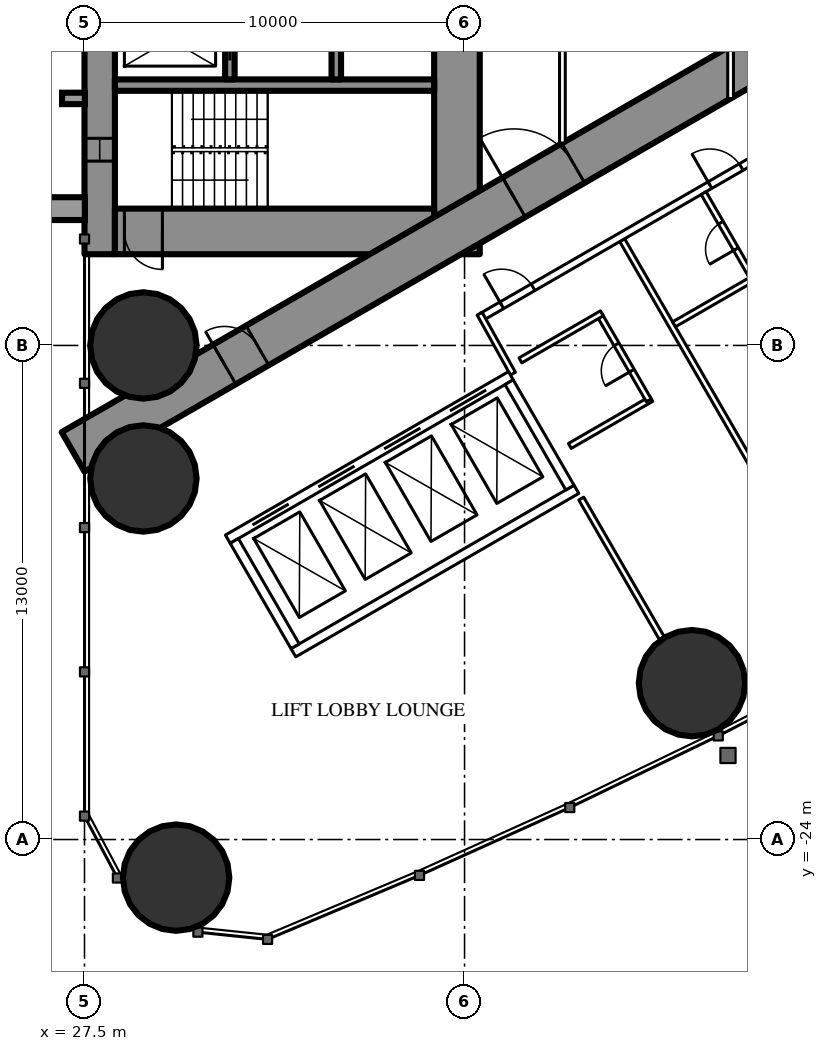
"""IFC4 building model, lengths in metres.
Left out: names, types, materials, properties, quantities, classifications, styles, units other than length and angle.
Written with IfcOpenShell. Run it as: python <this file> out.ifc"""

import sys

from ifc_helpers import new_model, si_unit, direction, frame, frame_2d, origin, origin_2d, place, context, subcontext, project, spatial, rectangle, hollow_circle, extrude, element, fill, save


model = new_model("IFC4")
c1 = context("Model", 3, precision=1e-05, world=origin(), true_north=direction((0.0, 1.0)))
c2 = subcontext(c1, "Body", "Model", "MODEL_VIEW")
j1 = project(units=[si_unit("LENGTHUNIT", "METRE"), si_unit("PLANEANGLEUNIT", "RADIAN")], contexts=[c1])
p1 = place(None, origin())
s1 = spatial("IfcSite", under=j1, at=p1, CompositionType="ELEMENT")
p2 = place(p1, origin())
s2 = spatial("IfcBuilding", under=s1, at=p2, CompositionType="ELEMENT")
p3 = place(p2, frame((0.0, 0.0, 53.0)))
s3 = spatial("IfcBuildingStorey", under=s2, at=p3, CompositionType="ELEMENT", Elevation=53.0)
for number, where, z_axis, x_axis in (
    (1, (29.911, -25.002, 0.0), (0.0, 0.0, 1.0), (1.0, 0.0, 0.0)),
    (2, (29.05, -11.0, 0.0), (0.0, 0.0, 1.0), (1.0, 0.0, 0.0)),
    (3, (29.05, -14.5, 0.0), (0.0, 0.0, 1.0), (1.0, 0.0, 0.0)),
    (4, (43.484, -19.886, 0.0), (0.0, 0.0, 1.0), (1.0, 0.0, 0.0)),
):
    element("IfcColumn", number, at=place(p3, frame(where, z_axis=z_axis, x_axis=x_axis)), inside=s3, PredefinedType="COLUMN", context=c2, shape_type="SweptSolid", body=[
        extrude(hollow_circle(Radius=1.4, WallThickness=0.12, at=origin_2d()), origin(), (0.0, 0.0, 1.0), 3.5),
    ])
p4 = place(p3, frame((27.9, -8.6, 0.0), z_axis=(0.0, 0.0, 1.0), x_axis=(0.0, 1.0, 0.0)))
e5 = element("IfcWall", 5, at=p4, inside=s3, PredefinedType="SHEAR", context=c2, shape_type="SweptSolid", body=[
    extrude(rectangle(XDim=17.2, YDim=0.8, at=frame_2d((8.6, 0.0))), origin(), (0.0, 0.0, 1.0), 3.5),
])
p5 = place(p4, frame((2.45, 0.0, 0.6)))
e6 = element("IfcOpeningElement", 6, at=p5, cuts=e5, PredefinedType="OPENING", context=c2, shape_type="SweptSolid", body=[
    extrude(rectangle(XDim=0.6, YDim=2.1, at=frame_2d((0.3, 1.05))), frame((0.0, 0.41, 0.0), z_axis=(0.0, -1.0, 0.0), x_axis=(1.0, 0.0, 0.0)), (0.0, 0.0, 1.0), 0.82),
])
p6 = place(p4, frame((14.15, 0.0, 0.6)))
e7 = element("IfcOpeningElement", 7, at=p6, cuts=e5, PredefinedType="OPENING", context=c2, shape_type="SweptSolid", body=[
    extrude(rectangle(XDim=0.6, YDim=2.1, at=frame_2d((0.3, 1.05))), frame((0.0, 0.41, 0.0), z_axis=(0.0, -1.0, 0.0), x_axis=(1.0, 0.0, 0.0)), (0.0, 0.0, 1.0), 0.82),
])
p7 = place(p3, frame((37.3, -8.6, 0.0), z_axis=(0.0, 0.0, 1.0), x_axis=(0.0, 1.0, 0.0)))
e8 = element("IfcWall", 8, at=p7, inside=s3, PredefinedType="SHEAR", context=c2, shape_type="SweptSolid", body=[
    extrude(rectangle(XDim=17.2, YDim=1.2, at=frame_2d((8.6, 0.0))), origin(), (0.0, 0.0, 1.0), 3.5),
])
p8 = place(p7, frame((7.7, 0.0, 0.0)))
e9 = element("IfcOpeningElement", 9, at=p8, cuts=e8, PredefinedType="OPENING", context=c2, shape_type="SweptSolid", body=[
    extrude(rectangle(XDim=1.8, YDim=2.2, at=frame_2d((0.9, 1.1))), frame((0.0, 0.61, 0.0), z_axis=(0.0, -1.0, 0.0), x_axis=(1.0, 0.0, 0.0)), (0.0, 0.0, 1.0), 1.22),
])
p9 = place(p3, frame((28.3, -8.0, 0.0), z_axis=(0.0, 0.0, 1.0), x_axis=(1.0, 0.0, 0.0)))
e10 = element("IfcWall", 10, at=p9, inside=s3, PredefinedType="SHEAR", context=c2, shape_type="SweptSolid", body=[
    extrude(rectangle(XDim=8.4, YDim=1.2, at=frame_2d((4.2, 0.0))), origin(), (0.0, 0.0, 1.0), 3.5),
])
p10 = place(p9, frame((0.25, 0.0, 0.0)))
e11 = element("IfcOpeningElement", 11, at=p10, cuts=e10, PredefinedType="OPENING", context=c2, shape_type="SweptSolid", body=[
    extrude(rectangle(XDim=1.0, YDim=2.2, at=frame_2d((0.5, 1.1))), frame((0.0, 0.61, 0.0), z_axis=(0.0, -1.0, 0.0), x_axis=(1.0, 0.0, 0.0)), (0.0, 0.0, 1.0), 1.22),
])
p11 = place(p3, frame((28.3, -4.15, 0.0), z_axis=(0.0, 0.0, 1.0), x_axis=(1.0, 0.0, 0.0)))
e12 = element("IfcWall", 12, at=p11, inside=s3, PredefinedType="SHEAR", context=c2, shape_type="SweptSolid", body=[
    extrude(rectangle(XDim=8.4, YDim=0.3, at=frame_2d((4.2, 0.0))), origin(), (0.0, 0.0, 1.0), 3.5),
])
p12 = place(p3, frame((31.325, -4.0, 0.0), z_axis=(0.0, 0.0, 1.0), x_axis=(0.0, 1.0, 0.0)))
e13 = element("IfcWall", 13, at=p12, inside=s3, PredefinedType="SHEAR", context=c2, shape_type="SweptSolid", body=[
    extrude(rectangle(XDim=2.1, YDim=0.25, at=frame_2d((1.05, 0.0))), origin(), (0.0, 0.0, 1.0), 3.5),
])
p13 = place(p12, frame((0.5, 0.0, 0.0)))
e14 = element("IfcOpeningElement", 14, at=p13, cuts=e13, PredefinedType="OPENING", context=c2, shape_type="SweptSolid", body=[
    extrude(rectangle(XDim=1.1, YDim=2.2, at=frame_2d((0.55, 1.1))), frame((0.0, 0.135, 0.0), z_axis=(0.0, -1.0, 0.0), x_axis=(1.0, 0.0, 0.0)), (0.0, 0.0, 1.0), 0.27),
])
p14 = place(p3, frame((34.125, -4.0, 0.0), z_axis=(0.0, 0.0, 1.0), x_axis=(0.0, 1.0, 0.0)))
e15 = element("IfcWall", 15, at=p14, inside=s3, PredefinedType="SHEAR", context=c2, shape_type="SweptSolid", body=[
    extrude(rectangle(XDim=2.35, YDim=0.25, at=frame_2d((1.175, 0.0))), origin(), (0.0, 0.0, 1.0), 3.5),
])
p15 = place(p3, frame((27.2, -13.8, 0.0), z_axis=(0.0, 0.0, 1.0), x_axis=(0.866027159892, 0.499996958321, 0.0)))
e16 = element("IfcWall", 16, at=p15, inside=s3, PredefinedType="SHEAR", context=c2, shape_type="SweptSolid", body=[
    extrude(rectangle(XDim=27.947, YDim=1.2, at=frame_2d((13.973, 0.0))), origin(), (0.0, 0.0, 1.0), 3.5),
])
p16 = place(p15, frame((4.6, 0.0, 0.0)))
e17 = element("IfcOpeningElement", 17, at=p16, cuts=e16, PredefinedType="OPENING", context=c2, shape_type="SweptSolid", body=[
    extrude(rectangle(XDim=1.0, YDim=2.2, at=frame_2d((0.5, 1.1))), frame((0.0, 0.61, 0.0), z_axis=(0.0, -1.0, 0.0), x_axis=(1.0, 0.0, 0.0)), (0.0, 0.0, 1.0), 1.22),
])
p17 = place(p15, frame((13.395, 0.0, 0.0)))
e18 = element("IfcOpeningElement", 18, at=p17, cuts=e16, PredefinedType="OPENING", context=c2, shape_type="SweptSolid", body=[
    extrude(rectangle(XDim=1.8, YDim=2.2, at=frame_2d((0.9, 1.1))), frame((0.0, 0.61, 0.0), z_axis=(0.0, -1.0, 0.0), x_axis=(1.0, 0.0, 0.0)), (0.0, 0.0, 1.0), 1.22),
])
p18 = place(p3, frame((41.647, -8.23, 0.0), z_axis=(0.0, 0.0, 1.0), x_axis=(0.49998590462, -0.866033541603, 0.0)))
e19 = element("IfcWall", 19, at=p18, inside=s3, PredefinedType="PARTITIONING", context=c2, shape_type="SweptSolid", body=[
    extrude(rectangle(XDim=12.621, YDim=0.15, at=frame_2d((6.311, 0.0))), origin(), (0.0, 0.0, 1.0), 3.25),
])
p19 = place(p3, frame((40.57, -15.03, 0.0), z_axis=(0.0, 0.0, 1.0), x_axis=(0.500012993597, -0.866017901798, 0.0)))
e20 = element("IfcWall", 20, at=p19, inside=s3, PredefinedType="PARTITIONING", context=c2, shape_type="SweptSolid", body=[
    extrude(rectangle(XDim=4.243, YDim=0.15, at=frame_2d((2.122, 0.0))), origin(), (0.0, 0.0, 1.0), 3.25),
])
p20 = place(p3, frame((37.96, -10.243, 0.0), z_axis=(0.0, 0.0, 1.0), x_axis=(0.866026429433, 0.499998223521, 0.0)))
e21 = element("IfcWall", 21, at=p20, inside=s3, PredefinedType="PARTITIONING", context=c2, shape_type="SweptSolid", body=[
    extrude(rectangle(XDim=20.487, YDim=0.2, at=frame_2d((10.243, 0.0))), origin(), (0.0, 0.0, 1.0), 3.25),
])
p21 = place(p20, frame((6.925, 0.0, 0.0)))
e22 = element("IfcOpeningElement", 22, at=p21, cuts=e21, PredefinedType="OPENING", context=c2, shape_type="SweptSolid", body=[
    extrude(rectangle(XDim=0.95, YDim=2.2, at=frame_2d((0.475, 1.1))), frame((0.0, 0.11, 0.0), z_axis=(0.0, -1.0, 0.0), x_axis=(1.0, 0.0, 0.0)), (0.0, 0.0, 1.0), 0.22),
])
p22 = place(p20, frame((11.549, 0.0, 0.0)))
e23 = element("IfcOpeningElement", 23, at=p22, cuts=e21, PredefinedType="OPENING", context=c2, shape_type="SweptSolid", body=[
    extrude(rectangle(XDim=0.95, YDim=2.2, at=frame_2d((0.475, 1.1))), frame((0.0, 0.11, 0.0), z_axis=(0.0, -1.0, 0.0), x_axis=(1.0, 0.0, 0.0)), (0.0, 0.0, 1.0), 0.22),
])
p23 = place(p20, frame((13.249, 0.0, 0.0)))
e24 = element("IfcOpeningElement", 24, at=p23, cuts=e21, PredefinedType="OPENING", context=c2, shape_type="SweptSolid", body=[
    extrude(rectangle(XDim=0.95, YDim=2.2, at=frame_2d((0.475, 1.1))), frame((0.0, 0.11, 0.0), z_axis=(0.0, -1.0, 0.0), x_axis=(1.0, 0.0, 0.0)), (0.0, 0.0, 1.0), 0.22),
])
p24 = place(p20, frame((17.585, 0.0, 0.0)))
e25 = element("IfcOpeningElement", 25, at=p24, cuts=e21, PredefinedType="OPENING", context=c2, shape_type="SweptSolid", body=[
    extrude(rectangle(XDim=0.95, YDim=2.2, at=frame_2d((0.475, 1.1))), frame((0.0, 0.11, 0.0), z_axis=(0.0, -1.0, 0.0), x_axis=(1.0, 0.0, 0.0)), (0.0, 0.0, 1.0), 0.22),
])
p25 = place(p20, frame((0.6, 0.0, 0.0)))
e26 = element("IfcOpeningElement", 26, at=p25, cuts=e21, PredefinedType="OPENING", context=c2, shape_type="SweptSolid", body=[
    extrude(rectangle(XDim=0.95, YDim=2.2, at=frame_2d((0.475, 1.1))), frame((0.0, 0.11, 0.0), z_axis=(0.0, -1.0, 0.0), x_axis=(1.0, 0.0, 0.0)), (0.0, 0.0, 1.0), 0.22),
])
p26 = place(p3, frame((38.773, -11.742, 0.0), z_axis=(0.0, 0.0, 1.0), x_axis=(-0.485528096672, 0.8742210632, 0.0)))
e27 = element("IfcWall", 27, at=p26, inside=s3, PredefinedType="PARTITIONING", context=c2, shape_type="SweptSolid", body=[
    extrude(rectangle(XDim=1.805, YDim=0.15, at=frame_2d((0.903, 0.0))), origin(), (0.0, 0.0, 1.0), 3.25),
])
p27 = place(p3, frame((43.012, -10.444, 0.0), z_axis=(0.0, 0.0, 1.0), x_axis=(0.866031185235, 0.4999899861, 0.0)))
e28 = element("IfcWall", 28, at=p27, inside=s3, PredefinedType="PARTITIONING", context=c2, shape_type="SweptSolid", body=[
    extrude(rectangle(XDim=2.475, YDim=0.15, at=frame_2d((1.238, 0.0))), origin(), (0.0, 0.0, 1.0), 3.25),
])
p28 = place(p3, frame((43.791, -6.993, 0.0), z_axis=(0.0, 0.0, 1.0), x_axis=(0.500047596559, -0.865997922154, 0.0)))
e29 = element("IfcWall", 29, at=p28, inside=s3, PredefinedType="PARTITIONING", context=c2, shape_type="SweptSolid", body=[
    extrude(rectangle(XDim=2.6, YDim=0.15, at=frame_2d((1.3, 0.0))), origin(), (0.0, 0.0, 1.0), 3.25),
])
p29 = place(p28, frame((0.9, 0.0, 0.0)))
e30 = element("IfcOpeningElement", 30, at=p29, cuts=e29, PredefinedType="OPENING", context=c2, shape_type="SweptSolid", body=[
    extrude(rectangle(XDim=0.8, YDim=2.2, at=frame_2d((0.4, 1.1))), frame((0.0, 0.085, 0.0), z_axis=(0.0, -1.0, 0.0), x_axis=(1.0, 0.0, 0.0)), (0.0, 0.0, 1.0), 0.17),
])
p30 = place(p3, frame((40.27, -13.644, 0.0), z_axis=(0.0, 0.0, 1.0), x_axis=(0.866031185235, 0.4999899861, 0.0)))
e31 = element("IfcWall", 31, at=p30, inside=s3, PredefinedType="PARTITIONING", context=c2, shape_type="SweptSolid", body=[
    extrude(rectangle(XDim=2.475, YDim=0.15, at=frame_2d((1.238, 0.0))), origin(), (0.0, 0.0, 1.0), 3.25),
])
p31 = place(p3, frame((41.048, -10.193, 0.0), z_axis=(0.0, 0.0, 1.0), x_axis=(0.500047596559, -0.865997922154, 0.0)))
e32 = element("IfcWall", 32, at=p31, inside=s3, PredefinedType="PARTITIONING", context=c2, shape_type="SweptSolid", body=[
    extrude(rectangle(XDim=2.6, YDim=0.15, at=frame_2d((1.3, 0.0))), origin(), (0.0, 0.0, 1.0), 3.25),
])
p32 = place(p31, frame((0.9, 0.0, 0.0)))
e33 = element("IfcOpeningElement", 33, at=p32, cuts=e32, PredefinedType="OPENING", context=c2, shape_type="SweptSolid", body=[
    extrude(rectangle(XDim=0.8, YDim=2.2, at=frame_2d((0.4, 1.1))), frame((0.0, 0.085, 0.0), z_axis=(0.0, -1.0, 0.0), x_axis=(1.0, 0.0, 0.0)), (0.0, 0.0, 1.0), 0.17),
])
p33 = place(p3, frame((38.97, -11.393, 0.0), z_axis=(0.0, 0.0, 1.0), x_axis=(0.866031185235, 0.4999899861, 0.0)))
e34 = element("IfcWall", 34, at=p33, inside=s3, PredefinedType="PARTITIONING", context=c2, shape_type="SweptSolid", body=[
    extrude(rectangle(XDim=2.475, YDim=0.15, at=frame_2d((1.238, 0.0))), origin(), (0.0, 0.0, 1.0), 3.25),
])
p34 = place(p3, frame((40.075, -5.674, 0.0), z_axis=(0.0, 0.0, 1.0), x_axis=(0.0, 1.0, 0.0)))
e35 = element("IfcWall", 35, at=p34, inside=s3, PredefinedType="PARTITIONING", context=c2, shape_type="SweptSolid", body=[
    extrude(rectangle(XDim=6.874, YDim=0.15, at=frame_2d((3.437, 0.0))), origin(), (0.0, 0.0, 1.0), 3.25),
])
p35 = place(p34, frame((2.537, 0.0, 0.0)))
e36 = element("IfcOpeningElement", 36, at=p35, cuts=e35, PredefinedType="OPENING", context=c2, shape_type="SweptSolid", body=[
    extrude(rectangle(XDim=1.8, YDim=2.2, at=frame_2d((0.9, 1.1))), frame((0.0, 0.085, 0.0), z_axis=(0.0, -1.0, 0.0), x_axis=(1.0, 0.0, 0.0)), (0.0, 0.0, 1.0), 0.17),
])
p36 = place(p3, frame((44.5, -4.505, 0.0), z_axis=(0.0, 0.0, 1.0), x_axis=(0.0, 1.0, 0.0)))
e37 = element("IfcWall", 37, at=p36, inside=s3, PredefinedType="PARTITIONING", context=c2, shape_type="SweptSolid", body=[
    extrude(rectangle(XDim=9.009, YDim=0.15, at=frame_2d((4.505, 0.0))), origin(), (0.0, 0.0, 1.0), 2.45),
])
p37 = place(p36, frame((1.752, 0.0, 0.0)))
e38 = element("IfcOpeningElement", 38, at=p37, cuts=e37, PredefinedType="OPENING", context=c2, shape_type="SweptSolid", body=[
    extrude(rectangle(XDim=1.0, YDim=2.2, at=frame_2d((0.5, 1.1))), frame((0.0, 0.085, 0.0), z_axis=(0.0, -1.0, 0.0), x_axis=(1.0, 0.0, 0.0)), (0.0, 0.0, 1.0), 0.17),
])
p38 = place(p36, frame((6.257, 0.0, 0.0)))
e39 = element("IfcOpeningElement", 39, at=p38, cuts=e37, PredefinedType="OPENING", context=c2, shape_type="SweptSolid", body=[
    extrude(rectangle(XDim=1.0, YDim=2.2, at=frame_2d((0.5, 1.1))), frame((0.0, 0.085, 0.0), z_axis=(0.0, -1.0, 0.0), x_axis=(1.0, 0.0, 0.0)), (0.0, 0.0, 1.0), 0.17),
])
p39 = place(p3, frame((31.271, -16.097, 0.0), z_axis=(0.0, 0.0, 1.0), x_axis=(0.86604045752, 0.499973925258, 0.0)))
e40 = element("IfcWall", 40, at=p39, inside=s3, PredefinedType="PARTITIONING", context=c2, shape_type="SweptSolid", body=[
    extrude(rectangle(XDim=8.6, YDim=0.25, at=frame_2d((4.3, 0.0))), origin(), (0.0, 0.0, 1.0), 3.25),
])
p40 = place(p39, frame((0.75, 0.0, 0.0)))
e41 = element("IfcOpeningElement", 41, at=p40, cuts=e40, PredefinedType="OPENING", context=c2, shape_type="SweptSolid", body=[
    extrude(rectangle(XDim=1.1, YDim=2.2, at=frame_2d((0.55, 1.1))), frame((0.0, 0.135, 0.0), z_axis=(0.0, -1.0, 0.0), x_axis=(1.0, 0.0, 0.0)), (0.0, 0.0, 1.0), 0.27),
])
p41 = place(p39, frame((2.75, 0.0, 0.0)))
e42 = element("IfcOpeningElement", 42, at=p41, cuts=e40, PredefinedType="OPENING", context=c2, shape_type="SweptSolid", body=[
    extrude(rectangle(XDim=1.1, YDim=2.2, at=frame_2d((0.55, 1.1))), frame((0.0, 0.135, 0.0), z_axis=(0.0, -1.0, 0.0), x_axis=(1.0, 0.0, 0.0)), (0.0, 0.0, 1.0), 0.27),
])
p42 = place(p39, frame((4.75, 0.0, 0.0)))
e43 = element("IfcOpeningElement", 43, at=p42, cuts=e40, PredefinedType="OPENING", context=c2, shape_type="SweptSolid", body=[
    extrude(rectangle(XDim=1.1, YDim=2.2, at=frame_2d((0.55, 1.1))), frame((0.0, 0.135, 0.0), z_axis=(0.0, -1.0, 0.0), x_axis=(1.0, 0.0, 0.0)), (0.0, 0.0, 1.0), 0.27),
])
p43 = place(p39, frame((6.75, 0.0, 0.0)))
e44 = element("IfcOpeningElement", 44, at=p43, cuts=e40, PredefinedType="OPENING", context=c2, shape_type="SweptSolid", body=[
    extrude(rectangle(XDim=1.1, YDim=2.2, at=frame_2d((0.55, 1.1))), frame((0.0, 0.135, 0.0), z_axis=(0.0, -1.0, 0.0), x_axis=(1.0, 0.0, 0.0)), (0.0, 0.0, 1.0), 0.27),
])
p44 = place(p3, frame((32.996, -19.086, 0.0), z_axis=(0.0, 0.0, 1.0), x_axis=(0.866028165386, 0.499995216735, 0.0)))
e45 = element("IfcWall", 45, at=p44, inside=s3, PredefinedType="PARTITIONING", context=c2, shape_type="SweptSolid", body=[
    extrude(rectangle(XDim=8.6, YDim=0.25, at=frame_2d((4.3, 0.0))), origin(), (0.0, 0.0, 1.0), 3.25),
])
for number, where, z_axis, x_axis in (
    (46, (31.441, -16.143, 0.0), (0.0, 0.0, 1.0), (0.5, -0.866, 0.0)),
    (47, (38.673, -11.968, 0.0), (0.0, 0.0, 1.0), (0.5, -0.866, 0.0)),
):
    element("IfcWall", number, at=place(p3, frame(where, z_axis=z_axis, x_axis=x_axis)), inside=s3, PredefinedType="PARTITIONING", context=c2, shape_type="SweptSolid", body=[
        extrude(rectangle(XDim=3.201, YDim=0.25, at=frame_2d((1.6, 0.0))), origin(), (0.0, 0.0, 1.0), 3.25),
    ])
p45 = place(p29, origin())
e48 = element("IfcDoor", 48, at=p45, inside=s3, OperationType="SINGLE_SWING_RIGHT", PredefinedType="DOOR", context=c2, shape_type="SweptSolid", body=[
    extrude(rectangle(XDim=0.8, YDim=2.2, at=frame_2d((0.4, 1.1))), frame((0.0, 0.025, 0.0), z_axis=(0.0, -1.0, 0.0), x_axis=(1.0, 0.0, 0.0)), (0.0, 0.0, 1.0), 0.05),
])
fill(e30, e48)
p46 = place(p21, origin())
e49 = element("IfcDoor", 49, at=p46, inside=s3, OperationType="SINGLE_SWING_LEFT", PredefinedType="DOOR", context=c2, shape_type="SweptSolid", body=[
    extrude(rectangle(XDim=0.95, YDim=2.2, at=frame_2d((0.475, 1.1))), frame((0.0, 0.025, 0.0), z_axis=(0.0, -1.0, 0.0), x_axis=(1.0, 0.0, 0.0)), (0.0, 0.0, 1.0), 0.05),
])
fill(e22, e49)
p47 = place(p32, origin())
e50 = element("IfcDoor", 50, at=p47, inside=s3, OperationType="SINGLE_SWING_RIGHT", PredefinedType="DOOR", context=c2, shape_type="SweptSolid", body=[
    extrude(rectangle(XDim=0.8, YDim=2.2, at=frame_2d((0.4, 1.1))), frame((0.0, 0.025, 0.0), z_axis=(0.0, -1.0, 0.0), x_axis=(1.0, 0.0, 0.0)), (0.0, 0.0, 1.0), 0.05),
])
fill(e33, e50)
p48 = place(p25, origin())
e51 = element("IfcDoor", 51, at=p48, inside=s3, OperationType="SINGLE_SWING_LEFT", PredefinedType="DOOR", context=c2, shape_type="SweptSolid", body=[
    extrude(rectangle(XDim=0.95, YDim=2.2, at=frame_2d((0.475, 1.1))), frame((0.0, 0.025, 0.0), z_axis=(0.0, -1.0, 0.0), x_axis=(1.0, 0.0, 0.0)), (0.0, 0.0, 1.0), 0.05),
])
fill(e26, e51)
p49 = place(p16, origin())
e52 = element("IfcDoor", 52, at=p49, inside=s3, OperationType="SINGLE_SWING_LEFT", PredefinedType="DOOR", context=c2, shape_type="SweptSolid", body=[
    extrude(rectangle(XDim=1.0, YDim=2.2, at=frame_2d((0.5, 1.1))), frame((0.0, 0.025, 0.0), z_axis=(0.0, -1.0, 0.0), x_axis=(1.0, 0.0, 0.0)), (0.0, 0.0, 1.0), 0.05),
])
fill(e17, e52)
p50 = place(p17, origin())
e53 = element("IfcDoor", 53, at=p50, inside=s3, OperationType="DOUBLE_DOOR_SINGLE_SWING", PredefinedType="DOOR", context=c2, shape_type="SweptSolid", body=[
    extrude(rectangle(XDim=1.8, YDim=2.2, at=frame_2d((0.9, 1.1))), frame((0.0, 0.025, 0.0), z_axis=(0.0, -1.0, 0.0), x_axis=(1.0, 0.0, 0.0)), (0.0, 0.0, 1.0), 0.05),
])
fill(e18, e53)
p51 = place(p10, origin())
e54 = element("IfcDoor", 54, at=p51, inside=s3, OperationType="SINGLE_SWING_RIGHT", PredefinedType="DOOR", context=c2, shape_type="SweptSolid", body=[
    extrude(rectangle(XDim=1.0, YDim=2.2, at=frame_2d((0.5, 1.1))), frame((0.0, 0.025, 0.0), z_axis=(0.0, -1.0, 0.0), x_axis=(1.0, 0.0, 0.0)), (0.0, 0.0, 1.0), 0.05),
])
fill(e11, e54)
p52 = place(p13, origin())
e55 = element("IfcDoor", 55, at=p52, inside=s3, OperationType="SLIDING_TO_LEFT", PredefinedType="USERDEFINED", context=c2, shape_type="SweptSolid", body=[
    extrude(rectangle(XDim=1.1, YDim=2.2, at=frame_2d((0.55, 1.1))), frame((0.0, 0.025, 0.0), z_axis=(0.0, -1.0, 0.0), x_axis=(1.0, 0.0, 0.0)), (0.0, 0.0, 1.0), 0.05),
])
fill(e14, e55)
p53 = place(p40, origin())
e56 = element("IfcDoor", 56, at=p53, inside=s3, OperationType="DOUBLE_DOOR_SLIDING", PredefinedType="USERDEFINED", context=c2, shape_type="SweptSolid", body=[
    extrude(rectangle(XDim=1.1, YDim=2.2, at=frame_2d((0.55, 1.1))), frame((0.0, 0.025, 0.0), z_axis=(0.0, -1.0, 0.0), x_axis=(1.0, 0.0, 0.0)), (0.0, 0.0, 1.0), 0.05),
])
fill(e41, e56)
p54 = place(p41, origin())
e57 = element("IfcDoor", 57, at=p54, inside=s3, OperationType="DOUBLE_DOOR_SLIDING", PredefinedType="USERDEFINED", context=c2, shape_type="SweptSolid", body=[
    extrude(rectangle(XDim=1.1, YDim=2.2, at=frame_2d((0.55, 1.1))), frame((0.0, 0.025, 0.0), z_axis=(0.0, -1.0, 0.0), x_axis=(1.0, 0.0, 0.0)), (0.0, 0.0, 1.0), 0.05),
])
fill(e42, e57)
p55 = place(p42, origin())
e58 = element("IfcDoor", 58, at=p55, inside=s3, OperationType="DOUBLE_DOOR_SLIDING", PredefinedType="USERDEFINED", context=c2, shape_type="SweptSolid", body=[
    extrude(rectangle(XDim=1.1, YDim=2.2, at=frame_2d((0.55, 1.1))), frame((0.0, 0.025, 0.0), z_axis=(0.0, -1.0, 0.0), x_axis=(1.0, 0.0, 0.0)), (0.0, 0.0, 1.0), 0.05),
])
fill(e43, e58)
p56 = place(p43, origin())
e59 = element("IfcDoor", 59, at=p56, inside=s3, OperationType="DOUBLE_DOOR_SLIDING", PredefinedType="USERDEFINED", context=c2, shape_type="SweptSolid", body=[
    extrude(rectangle(XDim=1.1, YDim=2.2, at=frame_2d((0.55, 1.1))), frame((0.0, 0.025, 0.0), z_axis=(0.0, -1.0, 0.0), x_axis=(1.0, 0.0, 0.0)), (0.0, 0.0, 1.0), 0.05),
])
fill(e44, e59)
p57 = place(p5, origin())
e60 = element("IfcWindow", 60, at=p57, inside=s3, PartitioningType="SINGLE_PANEL", PredefinedType="WINDOW", context=c2, shape_type="SweptSolid", body=[
    extrude(rectangle(XDim=0.6, YDim=2.1, at=frame_2d((0.3, 1.05))), frame((0.0, 0.03, 0.0), z_axis=(0.0, -1.0, 0.0), x_axis=(1.0, 0.0, 0.0)), (0.0, 0.0, 1.0), 0.06),
])
fill(e6, e60)
save(model, sys.argv[1])
